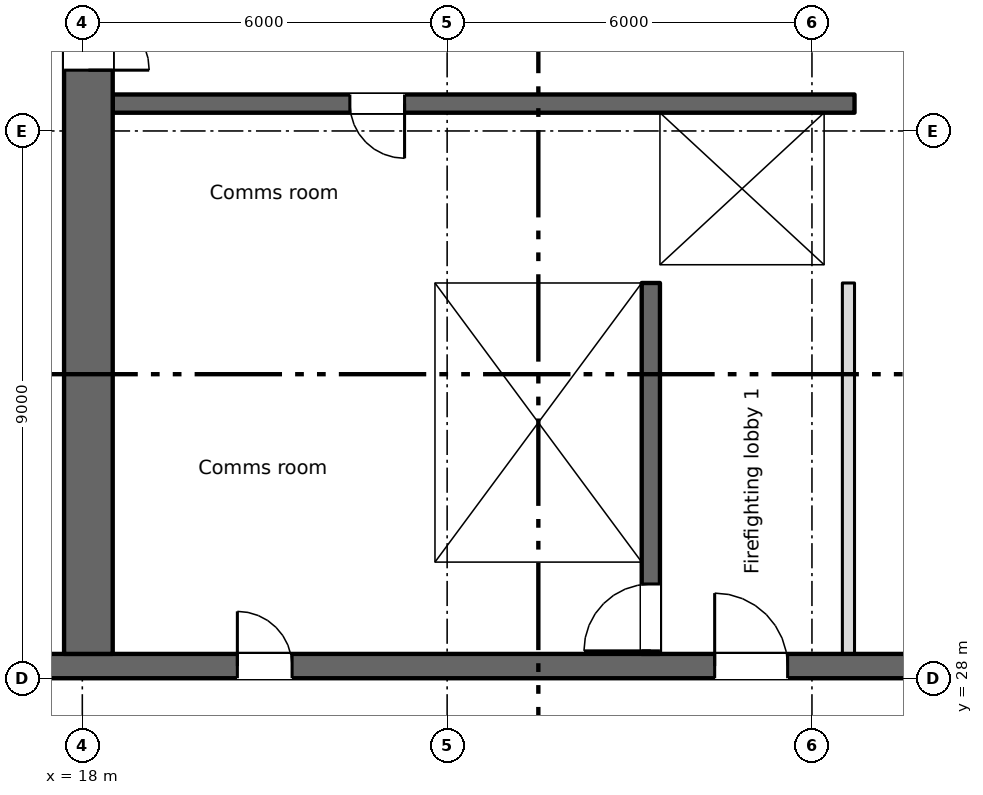
"""IFC4 building model, lengths in metres.
Left out: names, types, materials, properties, quantities, classifications, styles, units other than length and angle.
Written with IfcOpenShell. Run it as: python <this file> out.ifc"""

import sys

from ifc_helpers import new_model, si_unit, direction, frame, frame_2d, origin, place, context, subcontext, project, spatial, rectangle, extrude, element, fill, save


model = new_model("IFC4")
c1 = context("Model", 3, precision=1e-05, world=origin(), true_north=direction((0.0, 1.0)))
c2 = subcontext(c1, "Body", "Model", "MODEL_VIEW")
j1 = project(units=[si_unit("LENGTHUNIT", "METRE"), si_unit("PLANEANGLEUNIT", "RADIAN")], contexts=[c1])
p1 = place(None, origin())
s1 = spatial("IfcSite", under=j1, at=p1, CompositionType="ELEMENT")
p2 = place(p1, origin())
s2 = spatial("IfcBuilding", under=s1, at=p2, CompositionType="ELEMENT")
p3 = place(p2, frame((0.0, 0.0, 151.25)))
s3 = spatial("IfcBuildingStorey", under=s2, at=p3, CompositionType="ELEMENT", Elevation=151.25)
p4 = place(p3, frame((6.7, 28.2, 0.0), z_axis=(0.0, 0.0, 1.0), x_axis=(1.0, 0.0, 0.0)))
e1 = element("IfcWall", 1, at=p4, inside=s3, PredefinedType="SHEAR", context=c2, shape_type="SweptSolid", body=[
    extrude(rectangle(XDim=57.8, YDim=0.4, at=frame_2d((28.9, 0.0))), origin(), (0.0, 0.0, 1.0), 3.35),
])
p5 = place(p4, frame((13.85, 0.0, 0.0)))
e2 = element("IfcOpeningElement", 2, at=p5, cuts=e1, PredefinedType="OPENING", context=c2, shape_type="SweptSolid", body=[
    extrude(rectangle(XDim=0.9, YDim=2.1, at=frame_2d((0.45, 1.05))), frame((0.0, 0.21, 0.0), z_axis=(0.0, -1.0, 0.0), x_axis=(1.0, 0.0, 0.0)), (0.0, 0.0, 1.0), 0.42),
])
p6 = place(p4, frame((48.562, 0.0, 0.0)))
e3 = element("IfcOpeningElement", 3, at=p6, cuts=e1, PredefinedType="OPENING", context=c2, shape_type="SweptSolid", body=[
    extrude(rectangle(XDim=0.9, YDim=2.1, at=frame_2d((0.45, 1.05))), frame((0.0, 0.21, 0.0), z_axis=(0.0, -1.0, 0.0), x_axis=(1.0, 0.0, 0.0)), (0.0, 0.0, 1.0), 0.42),
])
p7 = place(p4, frame((51.137, 0.0, 0.0)))
e4 = element("IfcOpeningElement", 4, at=p7, cuts=e1, PredefinedType="OPENING", context=c2, shape_type="SweptSolid", body=[
    extrude(rectangle(XDim=0.9, YDim=2.1, at=frame_2d((0.45, 1.05))), frame((0.0, 0.21, 0.0), z_axis=(0.0, -1.0, 0.0), x_axis=(1.0, 0.0, 0.0)), (0.0, 0.0, 1.0), 0.42),
])
p8 = place(p4, frame((1.35, 0.0, 0.0)))
e5 = element("IfcOpeningElement", 5, at=p8, cuts=e1, PredefinedType="OPENING", context=c2, shape_type="SweptSolid", body=[
    extrude(rectangle(XDim=0.9, YDim=2.1, at=frame_2d((0.45, 1.05))), frame((0.0, 0.21, 0.0), z_axis=(0.0, -1.0, 0.0), x_axis=(1.0, 0.0, 0.0)), (0.0, 0.0, 1.0), 0.42),
])
p9 = place(p4, frame((4.7, 0.0, 0.0)))
e6 = element("IfcOpeningElement", 6, at=p9, cuts=e1, PredefinedType="OPENING", context=c2, shape_type="SweptSolid", body=[
    extrude(rectangle(XDim=1.2, YDim=2.1, at=frame_2d((0.6, 1.05))), frame((0.0, 0.21, 0.0), z_axis=(0.0, -1.0, 0.0), x_axis=(1.0, 0.0, 0.0)), (0.0, 0.0, 1.0), 0.42),
])
p10 = place(p4, frame((31.7, 0.0, 0.0)))
e7 = element("IfcOpeningElement", 7, at=p10, cuts=e1, PredefinedType="OPENING", context=c2, shape_type="SweptSolid", body=[
    extrude(rectangle(XDim=1.2, YDim=2.1, at=frame_2d((0.6, 1.05))), frame((0.0, 0.21, 0.0), z_axis=(0.0, -1.0, 0.0), x_axis=(1.0, 0.0, 0.0)), (0.0, 0.0, 1.0), 0.42),
])
p11 = place(p4, frame((55.2, 0.0, 0.0)))
e8 = element("IfcOpeningElement", 8, at=p11, cuts=e1, PredefinedType="OPENING", context=c2, shape_type="SweptSolid", body=[
    extrude(rectangle(XDim=1.2, YDim=2.1, at=frame_2d((0.6, 1.05))), frame((0.0, 0.21, 0.0), z_axis=(0.0, -1.0, 0.0), x_axis=(1.0, 0.0, 0.0)), (0.0, 0.0, 1.0), 0.42),
])
p12 = place(p4, frame((21.7, 0.0, 0.0)))
e9 = element("IfcOpeningElement", 9, at=p12, cuts=e1, PredefinedType="OPENING", context=c2, shape_type="SweptSolid", body=[
    extrude(rectangle(XDim=1.2, YDim=2.1, at=frame_2d((0.6, 1.05))), frame((0.0, 0.21, 0.0), z_axis=(0.0, -1.0, 0.0), x_axis=(1.0, 0.0, 0.0)), (0.0, 0.0, 1.0), 0.42),
])
p13 = place(p4, frame((41.7, 0.0, 0.0)))
e10 = element("IfcOpeningElement", 10, at=p13, cuts=e1, PredefinedType="OPENING", context=c2, shape_type="SweptSolid", body=[
    extrude(rectangle(XDim=1.2, YDim=2.1, at=frame_2d((0.6, 1.05))), frame((0.0, 0.21, 0.0), z_axis=(0.0, -1.0, 0.0), x_axis=(1.0, 0.0, 0.0)), (0.0, 0.0, 1.0), 0.42),
])
p14 = place(p4, frame((24.85, 0.0, 0.0)))
e11 = element("IfcOpeningElement", 11, at=p14, cuts=e1, PredefinedType="OPENING", context=c2, shape_type="SweptSolid", body=[
    extrude(rectangle(XDim=2.4, YDim=2.1, at=frame_2d((1.2, 1.05))), frame((0.0, 0.21, 0.0), z_axis=(0.0, -1.0, 0.0), x_axis=(1.0, 0.0, 0.0)), (0.0, 0.0, 1.0), 0.42),
])
p15 = place(p4, frame((37.35, 0.0, 0.0)))
e12 = element("IfcOpeningElement", 12, at=p15, cuts=e1, PredefinedType="OPENING", context=c2, shape_type="SweptSolid", body=[
    extrude(rectangle(XDim=2.4, YDim=2.1, at=frame_2d((1.2, 1.05))), frame((0.0, 0.21, 0.0), z_axis=(0.0, -1.0, 0.0), x_axis=(1.0, 0.0, 0.0)), (0.0, 0.0, 1.0), 0.42),
])
p16 = place(p4, frame((7.95, 0.0, 0.0)))
e13 = element("IfcOpeningElement", 13, at=p16, cuts=e1, PredefinedType="OPENING", context=c2, shape_type="SweptSolid", body=[
    extrude(rectangle(XDim=2.4, YDim=2.1, at=frame_2d((1.2, 1.05))), frame((0.0, 0.21, 0.0), z_axis=(0.0, -1.0, 0.0), x_axis=(1.0, 0.0, 0.0)), (0.0, 0.0, 1.0), 0.42),
])
p17 = place(p4, frame((28.85, 0.0, 0.0)))
e14 = element("IfcOpeningElement", 14, at=p17, cuts=e1, PredefinedType="OPENING", context=c2, shape_type="SweptSolid", body=[
    extrude(rectangle(XDim=0.9, YDim=2.1, at=frame_2d((0.45, 1.05))), frame((0.0, 0.21, 0.0), z_axis=(0.0, -1.0, 0.0), x_axis=(1.0, 0.0, 0.0)), (0.0, 0.0, 1.0), 0.42),
])
p18 = place(p4, frame((34.85, 0.0, 0.0)))
e15 = element("IfcOpeningElement", 15, at=p18, cuts=e1, PredefinedType="OPENING", context=c2, shape_type="SweptSolid", body=[
    extrude(rectangle(XDim=0.9, YDim=2.1, at=frame_2d((0.45, 1.05))), frame((0.0, 0.21, 0.0), z_axis=(0.0, -1.0, 0.0), x_axis=(1.0, 0.0, 0.0)), (0.0, 0.0, 1.0), 0.42),
])
p19 = place(p3, frame((18.1, 28.4, 0.0), z_axis=(0.0, 0.0, 1.0), x_axis=(0.0, 1.0, 0.0)))
e16 = element("IfcWall", 16, at=p19, inside=s3, PredefinedType="SHEAR", context=c2, shape_type="SweptSolid", body=[
    extrude(rectangle(XDim=16.8, YDim=0.8, at=frame_2d((8.4, 0.0))), origin(), (0.0, 0.0, 1.0), 3.35),
])
p20 = place(p19, frame((9.6, 0.0, 0.0)))
e17 = element("IfcOpeningElement", 17, at=p20, cuts=e16, PredefinedType="OPENING", context=c2, shape_type="SweptSolid", body=[
    extrude(rectangle(XDim=2.0, YDim=2.1, at=frame_2d((1.0, 1.05))), frame((0.0, 0.41, 0.0), z_axis=(0.0, -1.0, 0.0), x_axis=(1.0, 0.0, 0.0)), (0.0, 0.0, 1.0), 0.82),
])
p21 = place(p19, frame((15.35, 0.0, 0.0)))
e18 = element("IfcOpeningElement", 18, at=p21, cuts=e16, PredefinedType="OPENING", context=c2, shape_type="SweptSolid", body=[
    extrude(rectangle(XDim=1.2, YDim=2.1, at=frame_2d((0.6, 1.05))), frame((0.0, 0.41, 0.0), z_axis=(0.0, -1.0, 0.0), x_axis=(1.0, 0.0, 0.0)), (0.0, 0.0, 1.0), 0.82),
])
p22 = place(p3, frame((23.65, 28.4, 0.0), z_axis=(0.0, 0.0, 1.0), x_axis=(0.0, 1.0, 0.0)))
e19 = element("IfcWall", 19, at=p22, inside=s3, PredefinedType="SHEAR", context=c2, shape_type="SweptSolid", body=[
    extrude(rectangle(XDim=6.1, YDim=0.3, at=frame_2d((3.05, 0.0))), origin(), (0.0, 0.0, 1.0), 3.35),
])
p23 = place(p3, frame((27.35, 28.4, 0.0), z_axis=(0.0, 0.0, 1.0), x_axis=(0.0, 1.0, 0.0)))
e20 = element("IfcWall", 20, at=p23, inside=s3, PredefinedType="SHEAR", context=c2, shape_type="SweptSolid", body=[
    extrude(rectangle(XDim=6.1, YDim=0.3, at=frame_2d((3.05, 0.0))), origin(), (0.0, 0.0, 1.0), 3.35),
])
p24 = place(p23, frame((0.05, 0.0, 0.0)))
e21 = element("IfcOpeningElement", 21, at=p24, cuts=e20, PredefinedType="OPENING", context=c2, shape_type="SweptSolid", body=[
    extrude(rectangle(XDim=1.1, YDim=2.1, at=frame_2d((0.55, 1.05))), frame((0.0, 0.16, 0.0), z_axis=(0.0, -1.0, 0.0), x_axis=(1.0, 0.0, 0.0)), (0.0, 0.0, 1.0), 0.32),
])
p25 = place(p3, frame((18.5, 34.65, 0.0), z_axis=(0.0, 0.0, 1.0), x_axis=(1.0, 0.0, 0.0)))
e22 = element("IfcWall", 22, at=p25, inside=s3, PredefinedType="SHEAR", context=c2, shape_type="SweptSolid", body=[
    extrude(rectangle(XDim=12.2, YDim=0.3, at=frame_2d((6.1, 0.0))), origin(), (0.0, 0.0, 1.0), 3.35),
])
p26 = place(p25, frame((9.8, 0.0, 0.0)))
e23 = element("IfcOpeningElement", 23, at=p26, cuts=e22, PredefinedType="OPENING", context=c2, shape_type="SweptSolid", body=[
    extrude(rectangle(XDim=1.1, YDim=2.1, at=frame_2d((0.55, 1.05))), frame((0.0, 0.16, 0.0), z_axis=(0.0, -1.0, 0.0), x_axis=(1.0, 0.0, 0.0)), (0.0, 0.0, 1.0), 0.32),
])
p27 = place(p3, frame((30.7, 37.45, 0.0), z_axis=(0.0, 0.0, 1.0), x_axis=(-1.0, 0.0, 0.0)))
e24 = element("IfcWall", 24, at=p27, inside=s3, PredefinedType="SHEAR", context=c2, shape_type="SweptSolid", body=[
    extrude(rectangle(XDim=12.2, YDim=0.3, at=frame_2d((6.1, 0.0))), origin(), (0.0, 0.0, 1.0), 3.35),
])
p28 = place(p27, frame((7.4, 0.0, 0.0)))
e25 = element("IfcOpeningElement", 25, at=p28, cuts=e24, PredefinedType="OPENING", context=c2, shape_type="SweptSolid", body=[
    extrude(rectangle(XDim=0.9, YDim=2.1, at=frame_2d((0.45, 1.05))), frame((0.0, 0.16, 0.0), z_axis=(0.0, -1.0, 0.0), x_axis=(1.0, 0.0, 0.0)), (0.0, 0.0, 1.0), 0.32),
])
p29 = place(p3, frame((27.35, 34.8, 0.0), z_axis=(0.0, 0.0, 1.0), x_axis=(0.0, 1.0, 0.0)))
e26 = element("IfcWall", 26, at=p29, inside=s3, PredefinedType="SHEAR", context=c2, shape_type="SweptSolid", body=[
    extrude(rectangle(XDim=2.5, YDim=0.3, at=frame_2d((1.25, 0.0))), origin(), (0.0, 0.0, 1.0), 3.35),
])
p30 = place(p3, frame((30.45, 34.8, 0.0), z_axis=(0.0, 0.0, 1.0), x_axis=(0.0, 1.0, 0.0)))
e27 = element("IfcWall", 27, at=p30, inside=s3, PredefinedType="SHEAR", context=c2, shape_type="SweptSolid", body=[
    extrude(rectangle(XDim=2.5, YDim=0.5, at=frame_2d((1.25, 0.0))), origin(), (0.0, 0.0, 1.0), 3.35),
])
p31 = place(p3, frame((30.6, 28.4, 0.0), z_axis=(0.0, 0.0, 1.0), x_axis=(0.0, 1.0, 0.0)))
e28 = element("IfcWall", 28, at=p31, inside=s3, PredefinedType="PARTITIONING", context=c2, shape_type="SweptSolid", body=[
    extrude(rectangle(XDim=6.1, YDim=0.2, at=frame_2d((3.05, 0.0))), origin(), (0.0, 0.0, 1.0), 3.35),
])
p32 = place(p5, origin())
e29 = element("IfcDoor", 29, at=p32, inside=s3, OperationType="SINGLE_SWING_LEFT", PredefinedType="DOOR", context=c2, shape_type="SweptSolid", body=[
    extrude(rectangle(XDim=0.9, YDim=2.1, at=frame_2d((0.45, 1.05))), frame((0.0, 0.025, 0.0), z_axis=(0.0, -1.0, 0.0), x_axis=(1.0, 0.0, 0.0)), (0.0, 0.0, 1.0), 0.05),
])
fill(e2, e29)
p33 = place(p28, origin())
e30 = element("IfcDoor", 30, at=p33, inside=s3, OperationType="SINGLE_SWING_LEFT", PredefinedType="DOOR", context=c2, shape_type="SweptSolid", body=[
    extrude(rectangle(XDim=0.9, YDim=2.1, at=frame_2d((0.45, 1.05))), frame((0.0, 0.025, 0.0), z_axis=(0.0, -1.0, 0.0), x_axis=(1.0, 0.0, 0.0)), (0.0, 0.0, 1.0), 0.05),
])
fill(e25, e30)
p34 = place(p26, origin())
e31 = element("IfcDoor", 31, at=p34, inside=s3, OperationType="SLIDING_TO_LEFT", PredefinedType="DOOR", context=c2, shape_type="SweptSolid", body=[
    extrude(rectangle(XDim=1.1, YDim=2.1, at=frame_2d((0.55, 1.05))), frame((0.0, 0.025, 0.0), z_axis=(0.0, -1.0, 0.0), x_axis=(1.0, 0.0, 0.0)), (0.0, 0.0, 1.0), 0.05),
])
fill(e23, e31)
p35 = place(p24, origin())
e32 = element("IfcDoor", 32, at=p35, inside=s3, OperationType="SINGLE_SWING_LEFT", PredefinedType="DOOR", context=c2, shape_type="SweptSolid", body=[
    extrude(rectangle(XDim=1.1, YDim=2.1, at=frame_2d((0.55, 1.05))), frame((0.0, 0.025, 0.0), z_axis=(0.0, -1.0, 0.0), x_axis=(1.0, 0.0, 0.0)), (0.0, 0.0, 1.0), 0.05),
])
fill(e21, e32)
p36 = place(p12, origin())
e33 = element("IfcDoor", 33, at=p36, inside=s3, OperationType="SINGLE_SWING_LEFT", PredefinedType="DOOR", context=c2, shape_type="SweptSolid", body=[
    extrude(rectangle(XDim=1.2, YDim=2.1, at=frame_2d((0.6, 1.05))), frame((0.0, 0.025, 0.0), z_axis=(0.0, -1.0, 0.0), x_axis=(1.0, 0.0, 0.0)), (0.0, 0.0, 1.0), 0.05),
])
fill(e9, e33)
p37 = place(p20, origin())
e34 = element("IfcDoor", 34, at=p37, inside=s3, OperationType="DOUBLE_DOOR_SINGLE_SWING", PredefinedType="DOOR", context=c2, shape_type="SweptSolid", body=[
    extrude(rectangle(XDim=2.0, YDim=2.1, at=frame_2d((1.0, 1.05))), frame((0.0, 0.025, 0.0), z_axis=(0.0, -1.0, 0.0), x_axis=(1.0, 0.0, 0.0)), (0.0, 0.0, 1.0), 0.05),
])
fill(e17, e34)
save(model, sys.argv[1])
